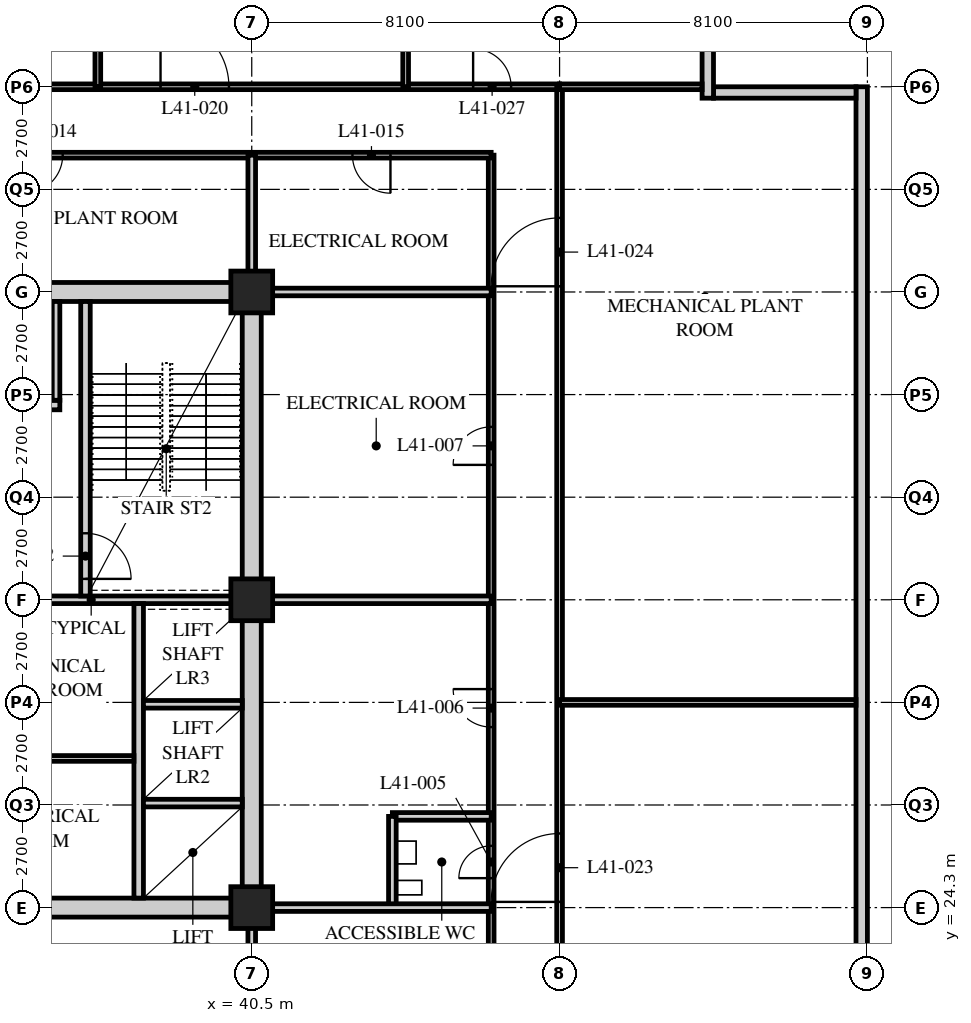
"""IFC4 building model, lengths in metres.
Left out: names, types, materials, properties, quantities, classifications, styles, units other than length and angle.
Written with IfcOpenShell. Run it as: python <this file> out.ifc"""

import sys

from ifc_helpers import new_model, si_unit, direction, frame, frame_2d, origin, origin_2d, place, context, subcontext, project, spatial, rectangle, hollow_rectangle, extrude, element, fill, save


model = new_model("IFC4")
c1 = context("Model", 3, precision=1e-05, world=origin(), true_north=direction((0.0, 1.0)))
c2 = subcontext(c1, "Body", "Model", "MODEL_VIEW")
j1 = project(units=[si_unit("LENGTHUNIT", "METRE"), si_unit("PLANEANGLEUNIT", "RADIAN")], contexts=[c1])
p1 = place(None, origin())
s1 = spatial("IfcSite", under=j1, at=p1, CompositionType="ELEMENT")
p2 = place(p1, origin())
s2 = spatial("IfcBuilding", under=s1, at=p2, CompositionType="ELEMENT")
p3 = place(p2, frame((0.0, 0.0, 157.8)))
s3 = spatial("IfcBuildingStorey", under=s2, at=p3, CompositionType="ELEMENT", Elevation=157.8)
for number, where, z_axis, x_axis in (
    (1, (40.5, 24.3, 0.0), (0.0, 0.0, 1.0), (1.0, 0.0, 0.0)),
    (2, (40.5, 32.4, 0.0), (0.0, 0.0, 1.0), (1.0, 0.0, 0.0)),
    (3, (40.5, 40.5, 0.0), (0.0, 0.0, 1.0), (1.0, 0.0, 0.0)),
):
    element("IfcColumn", number, at=place(p3, frame(where, z_axis=z_axis, x_axis=x_axis)), inside=s3, PredefinedType="COLUMN", context=c2, shape_type="SweptSolid", body=[
        extrude(hollow_rectangle(XDim=1.1, YDim=1.1, WallThickness=0.1, at=origin_2d()), origin(), (0.0, 0.0, 1.0), 7.2),
    ])
p4 = place(p3, frame((56.55, 13.8, 0.0), z_axis=(0.0, 0.0, 1.0), x_axis=(0.0, 1.0, 0.0)))
e4 = element("IfcWall", 4, at=p4, inside=s3, PredefinedType="SOLIDWALL", context=c2, shape_type="SweptSolid", body=[
    extrude(rectangle(XDim=32.1, YDim=0.3, at=frame_2d((16.05, 0.0))), origin(), (0.0, 0.0, 1.0), 5.95),
])
p5 = place(p3, frame((56.4, 45.75, 0.0), z_axis=(0.0, 0.0, 1.0), x_axis=(-1.0, 0.0, 0.0)))
e5 = element("IfcWall", 5, at=p5, inside=s3, PredefinedType="SOLIDWALL", context=c2, shape_type="SweptSolid", body=[
    extrude(rectangle(XDim=3.75, YDim=0.3, at=frame_2d((1.875, 0.0))), origin(), (0.0, 0.0, 1.0), 5.95),
])
p6 = place(p3, frame((52.5, 45.6, 0.0), z_axis=(0.0, 0.0, 1.0), x_axis=(0.0, 1.0, 0.0)))
e6 = element("IfcWall", 6, at=p6, inside=s3, PredefinedType="SOLIDWALL", context=c2, shape_type="SweptSolid", body=[
    extrude(rectangle(XDim=4.35, YDim=0.3, at=frame_2d((2.175, 0.0))), origin(), (0.0, 0.0, 1.0), 6.95),
])
p7 = place(p3, frame((8.1, 45.9, 0.0), z_axis=(0.0, 0.0, 1.0), x_axis=(1.0, 0.0, 0.0)))
e7 = element("IfcWall", 7, at=p7, inside=s3, PredefinedType="PARTITIONING", context=c2, shape_type="SweptSolid", body=[
    extrude(rectangle(XDim=40.5, YDim=0.15, at=frame_2d((20.25, 0.0))), origin(), (0.0, 0.0, 1.0), 5.95),
])
p8 = place(p7, frame((8.7, 0.0, 0.0)))
e8 = element("IfcOpeningElement", 8, at=p8, cuts=e7, PredefinedType="OPENING", context=c2, shape_type="SweptSolid", body=[
    extrude(rectangle(XDim=1.8, YDim=2.4, at=frame_2d((0.9, 1.2))), frame((0.0, 0.085, 0.0), z_axis=(0.0, -1.0, 0.0), x_axis=(1.0, 0.0, 0.0)), (0.0, 0.0, 1.0), 0.17),
])
p9 = place(p7, frame((19.35, 0.0, 0.0)))
e9 = element("IfcOpeningElement", 9, at=p9, cuts=e7, PredefinedType="OPENING", context=c2, shape_type="SweptSolid", body=[
    extrude(rectangle(XDim=1.8, YDim=2.4, at=frame_2d((0.9, 1.2))), frame((0.0, 0.085, 0.0), z_axis=(0.0, -1.0, 0.0), x_axis=(1.0, 0.0, 0.0)), (0.0, 0.0, 1.0), 0.17),
])
p10 = place(p7, frame((30.0, 0.0, 0.0)))
e10 = element("IfcOpeningElement", 10, at=p10, cuts=e7, PredefinedType="OPENING", context=c2, shape_type="SweptSolid", body=[
    extrude(rectangle(XDim=1.8, YDim=2.4, at=frame_2d((0.9, 1.2))), frame((0.0, 0.085, 0.0), z_axis=(0.0, -1.0, 0.0), x_axis=(1.0, 0.0, 0.0)), (0.0, 0.0, 1.0), 0.17),
])
p11 = place(p7, frame((38.225, 0.0, 0.0)))
e11 = element("IfcOpeningElement", 11, at=p11, cuts=e7, PredefinedType="OPENING", context=c2, shape_type="SweptSolid", body=[
    extrude(rectangle(XDim=1.0, YDim=2.1, at=frame_2d((0.5, 1.05))), frame((0.0, 0.085, 0.0), z_axis=(0.0, -1.0, 0.0), x_axis=(1.0, 0.0, 0.0)), (0.0, 0.0, 1.0), 0.17),
])
p12 = place(p7, frame((1.275, 0.0, 0.0)))
e12 = element("IfcOpeningElement", 12, at=p12, cuts=e7, PredefinedType="OPENING", context=c2, shape_type="SweptSolid", body=[
    extrude(rectangle(XDim=1.0, YDim=2.1, at=frame_2d((0.5, 1.05))), frame((0.0, 0.085, 0.0), z_axis=(0.0, -1.0, 0.0), x_axis=(1.0, 0.0, 0.0)), (0.0, 0.0, 1.0), 0.17),
])
p13 = place(p3, frame((48.6, 13.5, 0.0), z_axis=(0.0, 0.0, 1.0), x_axis=(0.0, 1.0, 0.0)))
e13 = element("IfcWall", 13, at=p13, inside=s3, PredefinedType="PARTITIONING", context=c2, shape_type="SweptSolid", body=[
    extrude(rectangle(XDim=32.4, YDim=0.15, at=frame_2d((16.2, 0.0))), origin(), (0.0, 0.0, 1.0), 5.95),
])
p14 = place(p13, frame((10.95, 0.0, 0.0)))
e14 = element("IfcOpeningElement", 14, at=p14, cuts=e13, PredefinedType="OPENING", context=c2, shape_type="SweptSolid", body=[
    extrude(rectangle(XDim=1.8, YDim=2.4, at=frame_2d((0.9, 1.2))), frame((0.0, 0.085, 0.0), z_axis=(0.0, -1.0, 0.0), x_axis=(1.0, 0.0, 0.0)), (0.0, 0.0, 1.0), 0.17),
])
p15 = place(p13, frame((27.15, 0.0, 0.0)))
e15 = element("IfcOpeningElement", 15, at=p15, cuts=e13, PredefinedType="OPENING", context=c2, shape_type="SweptSolid", body=[
    extrude(rectangle(XDim=1.8, YDim=2.4, at=frame_2d((0.9, 1.2))), frame((0.0, 0.085, 0.0), z_axis=(0.0, -1.0, 0.0), x_axis=(1.0, 0.0, 0.0)), (0.0, 0.0, 1.0), 0.17),
])
p16 = place(p3, frame((46.8, 15.3, 0.0), z_axis=(0.0, 0.0, 1.0), x_axis=(0.0, 1.0, 0.0)))
e16 = element("IfcWall", 16, at=p16, inside=s3, PredefinedType="PARTITIONING", context=c2, shape_type="SweptSolid", body=[
    extrude(rectangle(XDim=28.8, YDim=0.15, at=frame_2d((14.4, 0.0))), origin(), (0.0, 0.0, 1.0), 6.95),
])
p17 = place(p16, frame((9.775, 0.0, 0.0)))
e17 = element("IfcOpeningElement", 17, at=p17, cuts=e16, PredefinedType="OPENING", context=c2, shape_type="SweptSolid", body=[
    extrude(rectangle(XDim=0.85, YDim=2.1, at=frame_2d((0.425, 1.05))), frame((0.0, 0.085, 0.0), z_axis=(0.0, -1.0, 0.0), x_axis=(1.0, 0.0, 0.0)), (0.0, 0.0, 1.0), 0.17),
])
p18 = place(p16, frame((13.75, 0.0, 0.0)))
e18 = element("IfcOpeningElement", 18, at=p18, cuts=e16, PredefinedType="OPENING", context=c2, shape_type="SweptSolid", body=[
    extrude(rectangle(XDim=1.0, YDim=2.1, at=frame_2d((0.5, 1.05))), frame((0.0, 0.085, 0.0), z_axis=(0.0, -1.0, 0.0), x_axis=(1.0, 0.0, 0.0)), (0.0, 0.0, 1.0), 0.17),
])
p19 = place(p16, frame((20.65, 0.0, 0.0)))
e19 = element("IfcOpeningElement", 19, at=p19, cuts=e16, PredefinedType="OPENING", context=c2, shape_type="SweptSolid", body=[
    extrude(rectangle(XDim=1.0, YDim=2.1, at=frame_2d((0.5, 1.05))), frame((0.0, 0.085, 0.0), z_axis=(0.0, -1.0, 0.0), x_axis=(1.0, 0.0, 0.0)), (0.0, 0.0, 1.0), 0.17),
])
p20 = place(p3, frame((46.8, 44.1, 0.0), z_axis=(0.0, 0.0, 1.0), x_axis=(-1.0, 0.0, 0.0)))
e20 = element("IfcWall", 20, at=p20, inside=s3, PredefinedType="PARTITIONING", context=c2, shape_type="SweptSolid", body=[
    extrude(rectangle(XDim=17.24, YDim=0.15, at=frame_2d((8.62, 0.0))), origin(), (0.0, 0.0, 1.0), 6.95),
])
p21 = place(p20, frame((11.275, 0.0, 0.0)))
e21 = element("IfcOpeningElement", 21, at=p21, cuts=e20, PredefinedType="OPENING", context=c2, shape_type="SweptSolid", body=[
    extrude(rectangle(XDim=1.0, YDim=2.1, at=frame_2d((0.5, 1.05))), frame((0.0, 0.085, 0.0), z_axis=(0.0, -1.0, 0.0), x_axis=(1.0, 0.0, 0.0)), (0.0, 0.0, 1.0), 0.17),
])
p22 = place(p20, frame((2.65, 0.0, 0.0)))
e22 = element("IfcOpeningElement", 22, at=p22, cuts=e20, PredefinedType="OPENING", context=c2, shape_type="SweptSolid", body=[
    extrude(rectangle(XDim=1.0, YDim=2.1, at=frame_2d((0.5, 1.05))), frame((0.0, 0.085, 0.0), z_axis=(0.0, -1.0, 0.0), x_axis=(1.0, 0.0, 0.0)), (0.0, 0.0, 1.0), 0.17),
])
p23 = place(p3, frame((40.5, 32.4, 0.0), z_axis=(0.0, 0.0, 1.0), x_axis=(1.0, 0.0, 0.0)))
e23 = element("IfcWall", 23, at=p23, inside=s3, PredefinedType="SOLIDWALL", context=c2, shape_type="SweptSolid", body=[
    extrude(rectangle(XDim=6.3, YDim=0.2, at=frame_2d((3.15, 0.0))), origin(), (0.0, 0.0, 1.0), 6.95),
])
p24 = place(p3, frame((46.8, 26.7, 0.0), z_axis=(0.0, 0.0, 1.0), x_axis=(-1.0, 0.0, 0.0)))
e24 = element("IfcWall", 24, at=p24, inside=s3, PredefinedType="SOLIDWALL", context=c2, shape_type="SweptSolid", body=[
    extrude(rectangle(XDim=2.6, YDim=0.2, at=frame_2d((1.3, 0.0))), origin(), (0.0, 0.0, 1.0), 6.25),
])
p25 = place(p3, frame((44.2, 24.3, 0.0), z_axis=(0.0, 0.0, 1.0), x_axis=(0.0, 1.0, 0.0)))
e25 = element("IfcWall", 25, at=p25, inside=s3, PredefinedType="SOLIDWALL", context=c2, shape_type="SweptSolid", body=[
    extrude(rectangle(XDim=2.4, YDim=0.2, at=frame_2d((1.2, 0.0))), origin(), (0.0, 0.0, 1.0), 6.95),
])
p26 = place(p3, frame((40.5, 15.3, 0.0), z_axis=(0.0, 0.0, 1.0), x_axis=(0.0, 1.0, 0.0)))
e26 = element("IfcWall", 26, at=p26, inside=s3, PredefinedType="SOLIDWALL", context=c2, shape_type="SweptSolid", body=[
    extrude(rectangle(XDim=9.0, YDim=0.2, at=frame_2d((4.5, 0.0))), origin(), (0.0, 0.0, 1.0), 5.95),
])
p27 = place(p3, frame((40.5, 40.5, 0.0), z_axis=(0.0, 0.0, 1.0), x_axis=(0.0, 1.0, 0.0)))
e27 = element("IfcWall", 27, at=p27, inside=s3, PredefinedType="SOLIDWALL", context=c2, shape_type="SweptSolid", body=[
    extrude(rectangle(XDim=3.6, YDim=0.2, at=frame_2d((1.8, 0.0))), origin(), (0.0, 0.0, 1.0), 5.95),
])
for number, where, z_axis, x_axis in (
    (28, (40.5, 24.3, 0.0), (0.0, 0.0, 1.0), (1.0, 0.0, 0.0)),
    (29, (40.5, 40.5, 0.0), (0.0, 0.0, 1.0), (1.0, 0.0, 0.0)),
):
    element("IfcWall", number, at=place(p3, frame(where, z_axis=z_axis, x_axis=x_axis)), inside=s3, PredefinedType="SOLIDWALL", context=c2, shape_type="SweptSolid", body=[
        extrude(rectangle(XDim=6.3, YDim=0.2, at=frame_2d((3.15, 0.0))), origin(), (0.0, 0.0, 1.0), 6.95),
    ])
p28 = place(p3, frame((36.45, 45.9, 0.0), z_axis=(0.0, 0.0, 1.0), x_axis=(0.0, 1.0, 0.0)))
e30 = element("IfcWall", 30, at=p28, inside=s3, PredefinedType="PARTITIONING", context=c2, shape_type="SweptSolid", body=[
    extrude(rectangle(XDim=7.8, YDim=0.15, at=frame_2d((3.9, 0.0))), origin(), (0.0, 0.0, 1.0), 6.95),
])
p29 = place(p3, frame((48.6, 29.7, 0.0), z_axis=(0.0, 0.0, 1.0), x_axis=(1.0, 0.0, 0.0)))
e31 = element("IfcWall", 31, at=p29, inside=s3, PredefinedType="PARTITIONING", context=c2, shape_type="SweptSolid", body=[
    extrude(rectangle(XDim=7.8, YDim=0.15, at=frame_2d((3.9, 0.0))), origin(), (0.0, 0.0, 1.0), 6.95),
])
p30 = place(p3, frame((48.6, 45.9, 0.0), z_axis=(0.0, 0.0, 1.0), x_axis=(1.0, 0.0, 0.0)))
e32 = element("IfcWall", 32, at=p30, inside=s3, PredefinedType="PARTITIONING", context=c2, shape_type="SweptSolid", body=[
    extrude(rectangle(XDim=3.75, YDim=0.15, at=frame_2d((1.875, 0.0))), origin(), (0.0, 0.0, 1.0), 5.95),
])
p31 = place(p3, frame((44.55, 45.9, 0.0), z_axis=(0.0, 0.0, 1.0), x_axis=(0.0, 1.0, 0.0)))
e33 = element("IfcWall", 33, at=p31, inside=s3, PredefinedType="PARTITIONING", context=c2, shape_type="SweptSolid", body=[
    extrude(rectangle(XDim=7.8, YDim=0.15, at=frame_2d((3.9, 0.0))), origin(), (0.0, 0.0, 1.0), 6.95),
])
p32 = place(p3, frame((15.95, 24.3, 0.0), z_axis=(0.0, 0.0, 1.0), x_axis=(1.0, 0.0, 0.0)))
e34 = element("IfcWall", 34, at=p32, inside=s3, PredefinedType="SOLIDWALL", context=c2, shape_type="SweptSolid", body=[
    extrude(rectangle(XDim=24.8, YDim=0.5, at=frame_2d((12.4, 0.0))), origin(), (0.0, 0.0, 1.0), 6.18),
])
p33 = place(p32, frame((11.5, 0.0, 0.0)))
e35 = element("IfcOpeningElement", 35, at=p33, cuts=e34, PredefinedType="OPENING", context=c2, shape_type="SweptSolid", body=[
    extrude(rectangle(XDim=1.8, YDim=2.4, at=frame_2d((0.9, 1.2))), frame((0.0, 0.26, 0.0), z_axis=(0.0, -1.0, 0.0), x_axis=(1.0, 0.0, 0.0)), (0.0, 0.0, 1.0), 0.52),
])
p34 = place(p3, frame((15.95, 40.5, 0.0), z_axis=(0.0, 0.0, 1.0), x_axis=(1.0, 0.0, 0.0)))
e36 = element("IfcWall", 36, at=p34, inside=s3, PredefinedType="SOLIDWALL", context=c2, shape_type="SweptSolid", body=[
    extrude(rectangle(XDim=24.8, YDim=0.5, at=frame_2d((12.4, 0.0))), origin(), (0.0, 0.0, 1.0), 6.18),
])
p35 = place(p34, frame((11.5, 0.0, 0.0)))
e37 = element("IfcOpeningElement", 37, at=p35, cuts=e36, PredefinedType="OPENING", context=c2, shape_type="SweptSolid", body=[
    extrude(rectangle(XDim=1.8, YDim=2.4, at=frame_2d((0.9, 1.2))), frame((0.0, 0.26, 0.0), z_axis=(0.0, -1.0, 0.0), x_axis=(1.0, 0.0, 0.0)), (0.0, 0.0, 1.0), 0.52),
])
p36 = place(p3, frame((40.5, 24.55, 0.0), z_axis=(0.0, 0.0, 1.0), x_axis=(0.0, 1.0, 0.0)))
e38 = element("IfcWall", 38, at=p36, inside=s3, PredefinedType="SOLIDWALL", context=c2, shape_type="SweptSolid", body=[
    extrude(rectangle(XDim=15.7, YDim=0.5, at=frame_2d((7.85, 0.0))), origin(), (0.0, 0.0, 1.0), 5.95),
])
p37 = place(p3, frame((32.3, 32.4, 0.0), z_axis=(0.0, 0.0, 1.0), x_axis=(1.0, 0.0, 0.0)))
e39 = element("IfcWall", 39, at=p37, inside=s3, PredefinedType="SOLIDWALL", context=c2, shape_type="SweptSolid", body=[
    extrude(rectangle(XDim=7.95, YDim=0.2, at=frame_2d((3.975, 0.0))), origin(), (0.0, 0.0, 1.0), 6.25),
])
p38 = place(p3, frame((37.525, 24.55, 0.0), z_axis=(0.0, 0.0, 1.0), x_axis=(0.0, 1.0, 0.0)))
e40 = element("IfcWall", 40, at=p38, inside=s3, PredefinedType="SOLIDWALL", context=c2, shape_type="SweptSolid", body=[
    extrude(rectangle(XDim=7.75, YDim=0.25, at=frame_2d((3.875, 0.0))), origin(), (0.0, 0.0, 1.0), 6.95),
])
for number, where, z_axis, x_axis in (
    (41, (37.65, 27.05, 0.0), (0.0, 0.0, 1.0), (1.0, 0.0, 0.0)),
    (42, (37.65, 29.65, 0.0), (0.0, 0.0, 1.0), (1.0, 0.0, 0.0)),
):
    element("IfcWall", number, at=place(p3, frame(where, z_axis=z_axis, x_axis=x_axis)), inside=s3, PredefinedType="SOLIDWALL", context=c2, shape_type="SweptSolid", body=[
        extrude(rectangle(XDim=2.6, YDim=0.2, at=frame_2d((1.3, 0.0))), origin(), (0.0, 0.0, 1.0), 6.95),
    ])
p39 = place(p3, frame((36.125, 32.5, 0.0), z_axis=(0.0, 0.0, 1.0), x_axis=(0.0, 1.0, 0.0)))
e43 = element("IfcWall", 43, at=p39, inside=s3, PredefinedType="SOLIDWALL", context=c2, shape_type="SweptSolid", body=[
    extrude(rectangle(XDim=7.75, YDim=0.25, at=frame_2d((3.875, 0.0))), origin(), (0.0, 0.0, 1.0), 6.95),
])
p40 = place(p39, frame((0.45, 0.0, 0.0)))
e44 = element("IfcOpeningElement", 44, at=p40, cuts=e43, PredefinedType="OPENING", context=c2, shape_type="SweptSolid", body=[
    extrude(rectangle(XDim=1.2, YDim=2.1, at=frame_2d((0.6, 1.05))), frame((0.0, 0.135, 0.0), z_axis=(0.0, -1.0, 0.0), x_axis=(1.0, 0.0, 0.0)), (0.0, 0.0, 1.0), 0.27),
])
p41 = place(p3, frame((32.5, 37.525, 0.0), z_axis=(0.0, 0.0, 1.0), x_axis=(1.0, 0.0, 0.0)))
e45 = element("IfcWall", 45, at=p41, inside=s3, PredefinedType="SOLIDWALL", context=c2, shape_type="SweptSolid", body=[
    extrude(rectangle(XDim=2.95, YDim=0.25, at=frame_2d((1.475, 0.0))), origin(), (0.0, 0.0, 1.0), 6.95),
])
p42 = place(p41, frame((0.9, 0.0, 0.0)))
e46 = element("IfcOpeningElement", 46, at=p42, cuts=e45, PredefinedType="OPENING", context=c2, shape_type="SweptSolid", body=[
    extrude(rectangle(XDim=1.1, YDim=2.4, at=frame_2d((0.55, 1.2))), frame((0.0, 0.135, 0.0), z_axis=(0.0, -1.0, 0.0), x_axis=(1.0, 0.0, 0.0)), (0.0, 0.0, 1.0), 0.27),
])
p43 = place(p3, frame((35.35, 37.65, 0.0), z_axis=(0.0, 0.0, 1.0), x_axis=(0.0, 1.0, 0.0)))
e47 = element("IfcWall", 47, at=p43, inside=s3, PredefinedType="SOLIDWALL", context=c2, shape_type="SweptSolid", body=[
    extrude(rectangle(XDim=2.6, YDim=0.2, at=frame_2d((1.3, 0.0))), origin(), (0.0, 0.0, 1.0), 6.95),
])
p44 = place(p3, frame((32.5, 28.225, 0.0), z_axis=(0.0, 0.0, 1.0), x_axis=(1.0, 0.0, 0.0)))
e48 = element("IfcWall", 48, at=p44, inside=s3, PredefinedType="PARTITIONING", context=c2, shape_type="SweptSolid", body=[
    extrude(rectangle(XDim=4.9, YDim=0.15, at=frame_2d((2.45, 0.0))), origin(), (0.0, 0.0, 1.0), 6.95),
])
p45 = place(p17, origin())
e49 = element("IfcDoor", 49, at=p45, inside=s3, OperationType="SINGLE_SWING_LEFT", PredefinedType="DOOR", context=c2, shape_type="SweptSolid", body=[
    extrude(rectangle(XDim=0.85, YDim=2.1, at=frame_2d((0.425, 1.05))), frame((0.0, 0.025, 0.0), z_axis=(0.0, -1.0, 0.0), x_axis=(1.0, 0.0, 0.0)), (0.0, 0.0, 1.0), 0.05),
])
fill(e17, e49)
p46 = place(p18, origin())
e50 = element("IfcDoor", 50, at=p46, inside=s3, OperationType="SINGLE_SWING_RIGHT", PredefinedType="DOOR", context=c2, shape_type="SweptSolid", body=[
    extrude(rectangle(XDim=1.0, YDim=2.1, at=frame_2d((0.5, 1.05))), frame((0.0, 0.025, 0.0), z_axis=(0.0, -1.0, 0.0), x_axis=(1.0, 0.0, 0.0)), (0.0, 0.0, 1.0), 0.05),
])
fill(e18, e50)
p47 = place(p19, origin())
e51 = element("IfcDoor", 51, at=p47, inside=s3, OperationType="SINGLE_SWING_LEFT", PredefinedType="DOOR", context=c2, shape_type="SweptSolid", body=[
    extrude(rectangle(XDim=1.0, YDim=2.1, at=frame_2d((0.5, 1.05))), frame((0.0, 0.025, 0.0), z_axis=(0.0, -1.0, 0.0), x_axis=(1.0, 0.0, 0.0)), (0.0, 0.0, 1.0), 0.05),
])
fill(e19, e51)
p48 = place(p21, origin())
e52 = element("IfcDoor", 52, at=p48, inside=s3, OperationType="SINGLE_SWING_RIGHT", PredefinedType="DOOR", context=c2, shape_type="SweptSolid", body=[
    extrude(rectangle(XDim=1.0, YDim=2.1, at=frame_2d((0.5, 1.05))), frame((0.0, 0.025, 0.0), z_axis=(0.0, -1.0, 0.0), x_axis=(1.0, 0.0, 0.0)), (0.0, 0.0, 1.0), 0.05),
])
fill(e21, e52)
p49 = place(p22, origin())
e53 = element("IfcDoor", 53, at=p49, inside=s3, OperationType="SINGLE_SWING_LEFT", PredefinedType="DOOR", context=c2, shape_type="SweptSolid", body=[
    extrude(rectangle(XDim=1.0, YDim=2.1, at=frame_2d((0.5, 1.05))), frame((0.0, 0.025, 0.0), z_axis=(0.0, -1.0, 0.0), x_axis=(1.0, 0.0, 0.0)), (0.0, 0.0, 1.0), 0.05),
])
fill(e22, e53)
p50 = place(p10, origin())
e54 = element("IfcDoor", 54, at=p50, inside=s3, OperationType="DOUBLE_DOOR_SINGLE_SWING", PredefinedType="DOOR", context=c2, shape_type="SweptSolid", body=[
    extrude(rectangle(XDim=1.8, YDim=2.4, at=frame_2d((0.9, 1.2))), frame((0.0, 0.025, 0.0), z_axis=(0.0, -1.0, 0.0), x_axis=(1.0, 0.0, 0.0)), (0.0, 0.0, 1.0), 0.05),
])
fill(e10, e54)
p51 = place(p14, origin())
e55 = element("IfcDoor", 55, at=p51, inside=s3, OperationType="DOUBLE_DOOR_SINGLE_SWING", PredefinedType="DOOR", context=c2, shape_type="SweptSolid", body=[
    extrude(rectangle(XDim=1.8, YDim=2.4, at=frame_2d((0.9, 1.2))), frame((0.0, 0.025, 0.0), z_axis=(0.0, -1.0, 0.0), x_axis=(1.0, 0.0, 0.0)), (0.0, 0.0, 1.0), 0.05),
])
fill(e14, e55)
p52 = place(p15, origin())
e56 = element("IfcDoor", 56, at=p52, inside=s3, OperationType="DOUBLE_DOOR_SINGLE_SWING", PredefinedType="DOOR", context=c2, shape_type="SweptSolid", body=[
    extrude(rectangle(XDim=1.8, YDim=2.4, at=frame_2d((0.9, 1.2))), frame((0.0, 0.025, 0.0), z_axis=(0.0, -1.0, 0.0), x_axis=(1.0, 0.0, 0.0)), (0.0, 0.0, 1.0), 0.05),
])
fill(e15, e56)
p53 = place(p11, origin())
e57 = element("IfcDoor", 57, at=p53, inside=s3, OperationType="SINGLE_SWING_LEFT", PredefinedType="DOOR", context=c2, shape_type="SweptSolid", body=[
    extrude(rectangle(XDim=1.0, YDim=2.1, at=frame_2d((0.5, 1.05))), frame((0.0, 0.025, 0.0), z_axis=(0.0, -1.0, 0.0), x_axis=(1.0, 0.0, 0.0)), (0.0, 0.0, 1.0), 0.05),
])
fill(e11, e57)
p54 = place(p40, origin())
e58 = element("IfcDoor", 58, at=p54, inside=s3, OperationType="SINGLE_SWING_RIGHT", PredefinedType="DOOR", context=c2, shape_type="SweptSolid", body=[
    extrude(rectangle(XDim=1.2, YDim=2.1, at=frame_2d((0.6, 1.05))), frame((0.0, 0.025, 0.0), z_axis=(0.0, -1.0, 0.0), x_axis=(1.0, 0.0, 0.0)), (0.0, 0.0, 1.0), 0.05),
])
fill(e44, e58)
save(model, sys.argv[1])
